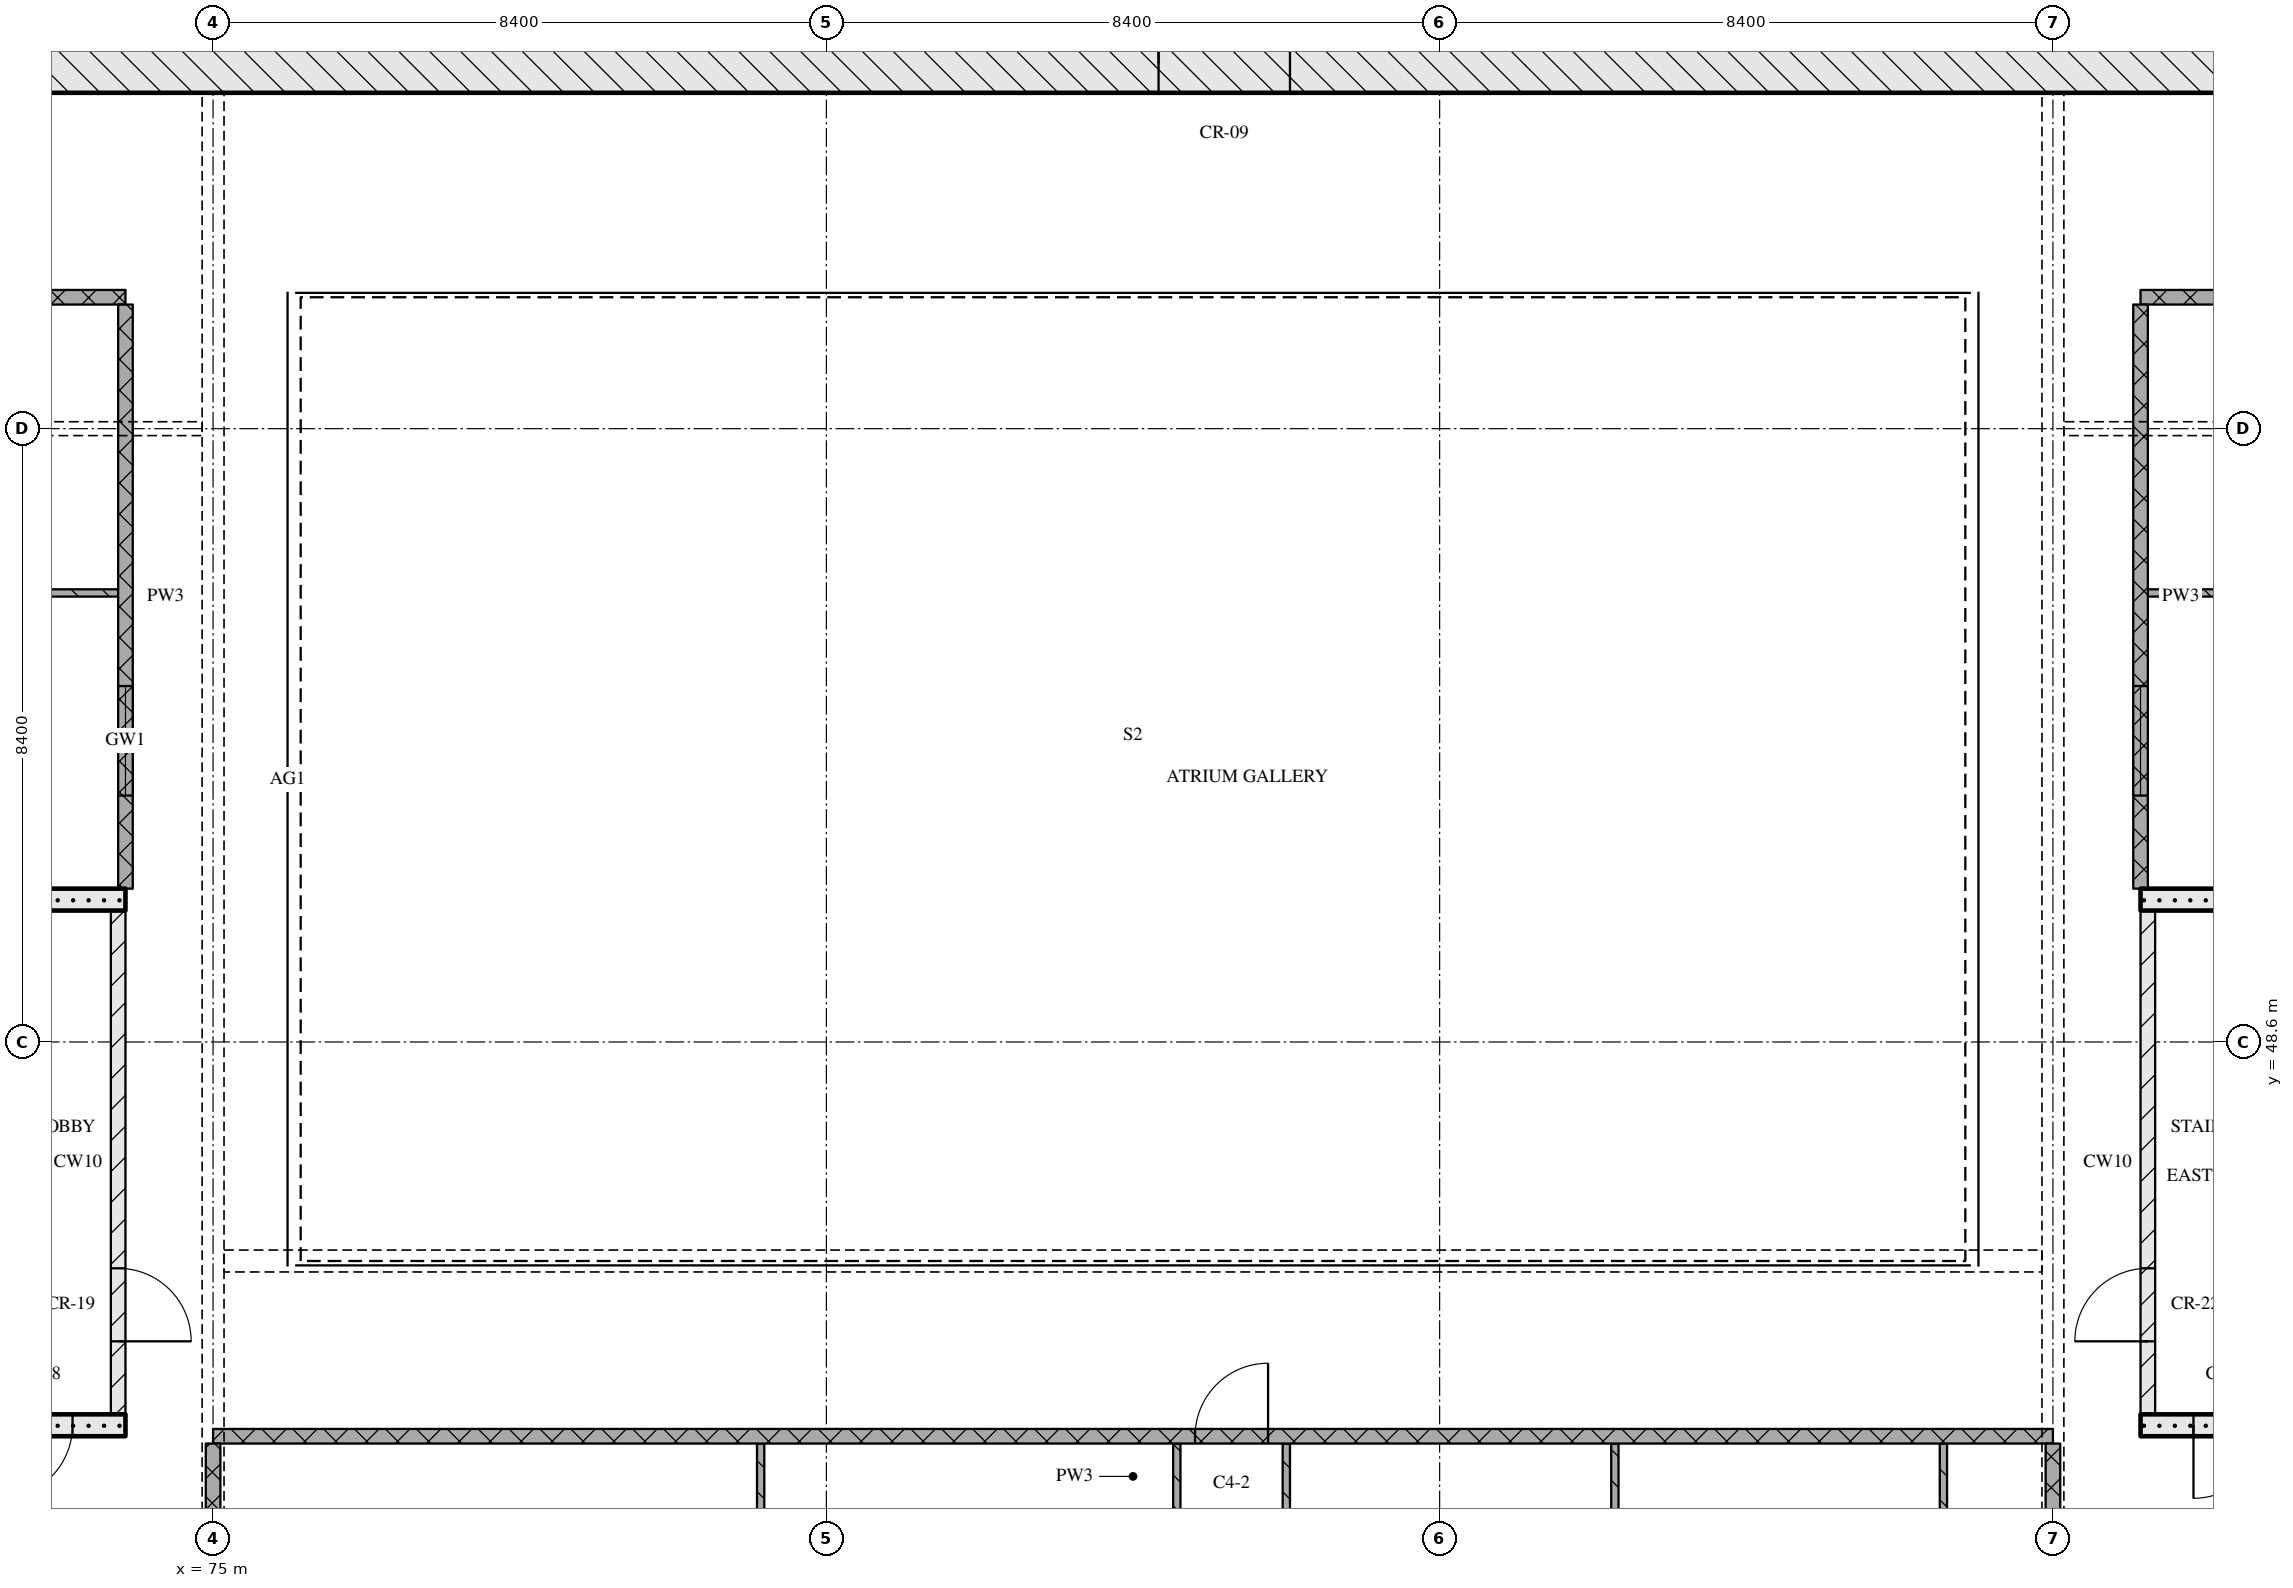
"""IFC4 building model, lengths in metres.
Left out: names, types, materials, properties, quantities, classifications, styles, units other than length and angle.
Written with IfcOpenShell. Run it as: python <this file> out.ifc"""

import sys

from ifc_helpers import new_model, si_unit, direction, frame, frame_2d, origin, place, context, subcontext, project, spatial, rectangle, extrude, element, fill, save


model = new_model("IFC4")
c1 = context("Model", 3, precision=1e-05, world=origin(), true_north=direction((0.0, 1.0)))
c2 = subcontext(c1, "Body", "Model", "MODEL_VIEW")
j1 = project(units=[si_unit("LENGTHUNIT", "METRE"), si_unit("PLANEANGLEUNIT", "RADIAN")], contexts=[c1])
p1 = place(None, origin())
s1 = spatial("IfcSite", under=j1, at=p1, CompositionType="ELEMENT")
p2 = place(p1, origin())
s2 = spatial("IfcBuilding", under=s1, at=p2, CompositionType="ELEMENT")
p3 = place(p2, frame((0.0, 0.0, 179.85)))
s3 = spatial("IfcBuildingStorey", under=s2, at=p3, CompositionType="ELEMENT", Elevation=179.85)
p4 = place(p3, frame((67.0, 62.0, 0.0), z_axis=(0.0, 0.0, 1.0), x_axis=(1.0, 0.0, 0.0)))
e1 = element("IfcWall", 1, at=p4, inside=s3, PredefinedType="SOLIDWALL", context=c2, shape_type="SweptSolid", body=[
    extrude(rectangle(XDim=41.2, YDim=0.8, at=frame_2d((20.6, 0.0))), origin(), (0.0, 0.0, 1.0), 3.32),
])
p5 = place(p4, frame((20.95, 0.0, 0.0)))
e2 = element("IfcOpeningElement", 2, at=p5, cuts=e1, PredefinedType="OPENING", context=c2, shape_type="SweptSolid", body=[
    extrude(rectangle(XDim=1.8, YDim=2.1, at=frame_2d((0.9, 1.05))), frame((0.0, 0.41, 0.0), z_axis=(0.0, -1.0, 0.0), x_axis=(1.0, 0.0, 0.0)), (0.0, 0.0, 1.0), 0.82),
])
p6 = place(p3, frame((68.2, 43.35, 0.0), z_axis=(0.0, 0.0, 1.0), x_axis=(1.0, 0.0, 0.0)))
e3 = element("IfcWall", 3, at=p6, inside=s3, PredefinedType="SOLIDWALL", context=c2, shape_type="SweptSolid", body=[
    extrude(rectangle(XDim=5.6, YDim=0.3, at=frame_2d((2.8, 0.0))), origin(), (0.0, 0.0, 1.0), 3.32),
])
p7 = place(p6, frame((3.875, 0.0, 0.0)))
e4 = element("IfcOpeningElement", 4, at=p7, cuts=e3, PredefinedType="OPENING", context=c2, shape_type="SweptSolid", body=[
    extrude(rectangle(XDim=1.0, YDim=2.1, at=frame_2d((0.5, 1.05))), frame((0.0, 0.16, 0.0), z_axis=(0.0, -1.0, 0.0), x_axis=(1.0, 0.0, 0.0)), (0.0, 0.0, 1.0), 0.32),
])
p8 = place(p3, frame((73.7, 43.5, 0.0), z_axis=(0.0, 0.0, 1.0), x_axis=(0.0, 1.0, 0.0)))
e5 = element("IfcWall", 5, at=p8, inside=s3, PredefinedType="PARTITIONING", context=c2, shape_type="SweptSolid", body=[
    extrude(rectangle(XDim=6.9, YDim=0.2, at=frame_2d((3.45, 0.0))), origin(), (0.0, 0.0, 1.0), 3.32),
])
p9 = place(p8, frame((1.0, 0.0, 0.0)))
e6 = element("IfcOpeningElement", 6, at=p9, cuts=e5, PredefinedType="OPENING", context=c2, shape_type="SweptSolid", body=[
    extrude(rectangle(XDim=1.0, YDim=2.1, at=frame_2d((0.5, 1.05))), frame((0.0, 0.11, 0.0), z_axis=(0.0, -1.0, 0.0), x_axis=(1.0, 0.0, 0.0)), (0.0, 0.0, 1.0), 0.22),
])
p10 = place(p3, frame((68.2, 50.55, 0.0), z_axis=(0.0, 0.0, 1.0), x_axis=(1.0, 0.0, 0.0)))
e7 = element("IfcWall", 7, at=p10, inside=s3, PredefinedType="SOLIDWALL", context=c2, shape_type="SweptSolid", body=[
    extrude(rectangle(XDim=5.6, YDim=0.3, at=frame_2d((2.8, 0.0))), origin(), (0.0, 0.0, 1.0), 3.32),
])
p11 = place(p3, frame((101.4, 43.35, 0.0), z_axis=(0.0, 0.0, 1.0), x_axis=(1.0, 0.0, 0.0)))
e8 = element("IfcWall", 8, at=p11, inside=s3, PredefinedType="SOLIDWALL", context=c2, shape_type="SweptSolid", body=[
    extrude(rectangle(XDim=5.6, YDim=0.3, at=frame_2d((2.8, 0.0))), origin(), (0.0, 0.0, 1.0), 3.32),
])
p12 = place(p11, frame((0.725, 0.0, 0.0)))
e9 = element("IfcOpeningElement", 9, at=p12, cuts=e8, PredefinedType="OPENING", context=c2, shape_type="SweptSolid", body=[
    extrude(rectangle(XDim=1.0, YDim=2.1, at=frame_2d((0.5, 1.05))), frame((0.0, 0.16, 0.0), z_axis=(0.0, -1.0, 0.0), x_axis=(1.0, 0.0, 0.0)), (0.0, 0.0, 1.0), 0.32),
])
p13 = place(p3, frame((101.5, 43.5, 0.0), z_axis=(0.0, 0.0, 1.0), x_axis=(0.0, 1.0, 0.0)))
e10 = element("IfcWall", 10, at=p13, inside=s3, PredefinedType="PARTITIONING", context=c2, shape_type="SweptSolid", body=[
    extrude(rectangle(XDim=6.9, YDim=0.2, at=frame_2d((3.45, 0.0))), origin(), (0.0, 0.0, 1.0), 3.32),
])
p14 = place(p13, frame((1.0, 0.0, 0.0)))
e11 = element("IfcOpeningElement", 11, at=p14, cuts=e10, PredefinedType="OPENING", context=c2, shape_type="SweptSolid", body=[
    extrude(rectangle(XDim=1.0, YDim=2.1, at=frame_2d((0.5, 1.05))), frame((0.0, 0.11, 0.0), z_axis=(0.0, -1.0, 0.0), x_axis=(1.0, 0.0, 0.0)), (0.0, 0.0, 1.0), 0.22),
])
p15 = place(p3, frame((101.4, 50.55, 0.0), z_axis=(0.0, 0.0, 1.0), x_axis=(1.0, 0.0, 0.0)))
e12 = element("IfcWall", 12, at=p15, inside=s3, PredefinedType="SOLIDWALL", context=c2, shape_type="SweptSolid", body=[
    extrude(rectangle(XDim=5.6, YDim=0.3, at=frame_2d((2.8, 0.0))), origin(), (0.0, 0.0, 1.0), 3.32),
])
p16 = place(p3, frame((100.2, 43.2, 0.0), z_axis=(0.0, 0.0, 1.0), x_axis=(-1.0, 0.0, 0.0)))
e13 = element("IfcWall", 13, at=p16, inside=s3, PredefinedType="PARTITIONING", context=c2, shape_type="SweptSolid", body=[
    extrude(rectangle(XDim=25.2, YDim=0.2, at=frame_2d((12.6, 0.0))), origin(), (0.0, 0.0, 1.0), 3.32),
])
p17 = place(p16, frame((10.75, 0.0, 0.0)))
e14 = element("IfcOpeningElement", 14, at=p17, cuts=e13, PredefinedType="OPENING", context=c2, shape_type="SweptSolid", body=[
    extrude(rectangle(XDim=1.0, YDim=2.1, at=frame_2d((0.5, 1.05))), frame((0.0, 0.11, 0.0), z_axis=(0.0, -1.0, 0.0), x_axis=(1.0, 0.0, 0.0)), (0.0, 0.0, 1.0), 0.22),
])
p18 = place(p3, frame((73.7, 54.75, 0.0), z_axis=(0.0, 0.0, 1.0), x_axis=(-1.0, 0.0, 0.0)))
e15 = element("IfcWall", 15, at=p18, inside=s3, PredefinedType="PARTITIONING", context=c2, shape_type="SweptSolid", body=[
    extrude(rectangle(XDim=6.2, YDim=0.1, at=frame_2d((3.1, 0.0))), origin(), (0.0, 0.0, 1.0), 3.32),
])
p19 = place(p18, frame((2.6, 0.0, 0.0)))
e16 = element("IfcOpeningElement", 16, at=p19, cuts=e15, PredefinedType="OPENING", context=c2, shape_type="SweptSolid", body=[
    extrude(rectangle(XDim=0.9, YDim=2.1, at=frame_2d((0.45, 1.05))), frame((0.0, 0.06, 0.0), z_axis=(0.0, -1.0, 0.0), x_axis=(1.0, 0.0, 0.0)), (0.0, 0.0, 1.0), 0.12),
])
p20 = place(p3, frame((101.5, 54.75, 0.0), z_axis=(0.0, 0.0, 1.0), x_axis=(1.0, 0.0, 0.0)))
e17 = element("IfcWall", 17, at=p20, inside=s3, PredefinedType="PARTITIONING", context=c2, shape_type="SweptSolid", body=[
    extrude(rectangle(XDim=6.2, YDim=0.1, at=frame_2d((3.1, 0.0))), origin(), (0.0, 0.0, 1.0), 3.32),
])
p21 = place(p3, frame((63.0, 58.8, 0.0), z_axis=(0.0, 0.0, 1.0), x_axis=(1.0, 0.0, 0.0)))
e18 = element("IfcWall", 18, at=p21, inside=s3, PredefinedType="PARTITIONING", context=c2, shape_type="SweptSolid", body=[
    extrude(rectangle(XDim=10.8, YDim=0.2, at=frame_2d((5.4, 0.0))), origin(), (0.0, 0.0, 1.0), 3.32),
])
p22 = place(p3, frame((112.2, 58.8, 0.0), z_axis=(0.0, 0.0, 1.0), x_axis=(-1.0, 0.0, 0.0)))
e19 = element("IfcWall", 19, at=p22, inside=s3, PredefinedType="PARTITIONING", context=c2, shape_type="SweptSolid", body=[
    extrude(rectangle(XDim=10.8, YDim=0.2, at=frame_2d((5.4, 0.0))), origin(), (0.0, 0.0, 1.0), 3.32),
])
p23 = place(p22, frame((2.85, 0.0, 0.0)))
e20 = element("IfcOpeningElement", 20, at=p23, cuts=e19, PredefinedType="OPENING", context=c2, shape_type="SweptSolid", body=[
    extrude(rectangle(XDim=1.0, YDim=2.1, at=frame_2d((0.5, 1.05))), frame((0.0, 0.11, 0.0), z_axis=(0.0, -1.0, 0.0), x_axis=(1.0, 0.0, 0.0)), (0.0, 0.0, 1.0), 0.22),
])
p24 = place(p3, frame((73.8, 58.7, 0.0), z_axis=(0.0, 0.0, 1.0), x_axis=(0.0, -1.0, 0.0)))
e21 = element("IfcWall", 21, at=p24, inside=s3, PredefinedType="PARTITIONING", context=c2, shape_type="SweptSolid", body=[
    extrude(rectangle(XDim=8.0, YDim=0.2, at=frame_2d((4.0, 0.0))), origin(), (0.0, 0.0, 1.0), 3.32),
])
p25 = place(p24, frame((5.225, 0.0, 0.9)))
e22 = element("IfcOpeningElement", 22, at=p25, cuts=e21, PredefinedType="OPENING", context=c2, shape_type="SweptSolid", body=[
    extrude(rectangle(XDim=1.5, YDim=1.5, at=frame_2d((0.75, 0.75))), frame((0.0, 0.11, 0.0), z_axis=(0.0, -1.0, 0.0), x_axis=(1.0, 0.0, 0.0)), (0.0, 0.0, 1.0), 0.22),
])
p26 = place(p3, frame((75.0, 43.1, 0.0), z_axis=(0.0, 0.0, 1.0), x_axis=(0.0, -1.0, 0.0)))
e23 = element("IfcWall", 23, at=p26, inside=s3, PredefinedType="PARTITIONING", context=c2, shape_type="SweptSolid", body=[
    extrude(rectangle(XDim=2.2, YDim=0.2, at=frame_2d((1.1, 0.0))), origin(), (0.0, 0.0, 1.0), 2.43),
])
p27 = place(p3, frame((82.5, 43.1, 0.0), z_axis=(0.0, 0.0, 1.0), x_axis=(0.0, -1.0, 0.0)))
e24 = element("IfcWall", 24, at=p27, inside=s3, PredefinedType="PARTITIONING", context=c2, shape_type="SweptSolid", body=[
    extrude(rectangle(XDim=4.95, YDim=0.1, at=frame_2d((2.475, 0.0))), origin(), (0.0, 0.0, 1.0), 3.32),
])
p28 = place(p3, frame((88.2, 38.15, 0.0), z_axis=(0.0, 0.0, 1.0), x_axis=(0.0, 1.0, 0.0)))
e25 = element("IfcWall", 25, at=p28, inside=s3, PredefinedType="PARTITIONING", context=c2, shape_type="SweptSolid", body=[
    extrude(rectangle(XDim=4.95, YDim=0.1, at=frame_2d((2.475, 0.0))), origin(), (0.0, 0.0, 1.0), 3.32),
])
p29 = place(p28, frame((2.05, 0.0, 0.0)))
e26 = element("IfcOpeningElement", 26, at=p29, cuts=e25, PredefinedType="OPENING", context=c2, shape_type="SweptSolid", body=[
    extrude(rectangle(XDim=0.9, YDim=2.1, at=frame_2d((0.45, 1.05))), frame((0.0, 0.06, 0.0), z_axis=(0.0, -1.0, 0.0), x_axis=(1.0, 0.0, 0.0)), (0.0, 0.0, 1.0), 0.12),
])
p30 = place(p3, frame((89.7, 43.1, 0.0), z_axis=(0.0, 0.0, 1.0), x_axis=(0.0, -1.0, 0.0)))
e27 = element("IfcWall", 27, at=p30, inside=s3, PredefinedType="PARTITIONING", context=c2, shape_type="SweptSolid", body=[
    extrude(rectangle(XDim=4.95, YDim=0.1, at=frame_2d((2.475, 0.0))), origin(), (0.0, 0.0, 1.0), 3.32),
])
p31 = place(p30, frame((2.05, 0.0, 0.0)))
e28 = element("IfcOpeningElement", 28, at=p31, cuts=e27, PredefinedType="OPENING", context=c2, shape_type="SweptSolid", body=[
    extrude(rectangle(XDim=0.8, YDim=2.1, at=frame_2d((0.4, 1.05))), frame((0.0, 0.06, 0.0), z_axis=(0.0, -1.0, 0.0), x_axis=(1.0, 0.0, 0.0)), (0.0, 0.0, 1.0), 0.12),
])
for number, where, z_axis, x_axis in (
    (29, (94.2, 43.1, 0.0), (0.0, 0.0, 1.0), (0.0, -1.0, 0.0)),
    (30, (98.7, 43.1, 0.0), (0.0, 0.0, 1.0), (0.0, -1.0, 0.0)),
):
    element("IfcWall", number, at=place(p3, frame(where, z_axis=z_axis, x_axis=x_axis)), inside=s3, PredefinedType="PARTITIONING", context=c2, shape_type="SweptSolid", body=[
        extrude(rectangle(XDim=4.95, YDim=0.1, at=frame_2d((2.475, 0.0))), origin(), (0.0, 0.0, 1.0), 3.32),
    ])
p32 = place(p3, frame((100.2, 43.1, 0.0), z_axis=(0.0, 0.0, 1.0), x_axis=(0.0, -1.0, 0.0)))
e31 = element("IfcWall", 31, at=p32, inside=s3, PredefinedType="PARTITIONING", context=c2, shape_type="SweptSolid", body=[
    extrude(rectangle(XDim=2.2, YDim=0.2, at=frame_2d((1.1, 0.0))), origin(), (0.0, 0.0, 1.0), 2.43),
])
p33 = place(p3, frame((101.4, 58.7, 0.0), z_axis=(0.0, 0.0, 1.0), x_axis=(0.0, -1.0, 0.0)))
e32 = element("IfcWall", 32, at=p33, inside=s3, PredefinedType="PARTITIONING", context=c2, shape_type="SweptSolid", body=[
    extrude(rectangle(XDim=8.0, YDim=0.2, at=frame_2d((4.0, 0.0))), origin(), (0.0, 0.0, 1.0), 3.32),
])
p34 = place(p33, frame((5.225, 0.0, 0.9)))
e33 = element("IfcOpeningElement", 33, at=p34, cuts=e32, PredefinedType="OPENING", context=c2, shape_type="SweptSolid", body=[
    extrude(rectangle(XDim=1.5, YDim=1.5, at=frame_2d((0.75, 0.75))), frame((0.0, 0.11, 0.0), z_axis=(0.0, -1.0, 0.0), x_axis=(1.0, 0.0, 0.0)), (0.0, 0.0, 1.0), 0.22),
])
p35 = place(p5, origin())
e34 = element("IfcDoor", 34, at=p35, inside=s3, OperationType="DOUBLE_DOOR_SINGLE_SWING", PredefinedType="DOOR", context=c2, shape_type="SweptSolid", body=[
    extrude(rectangle(XDim=1.8, YDim=2.1, at=frame_2d((0.9, 1.05))), frame((0.0, 0.025, 0.0), z_axis=(0.0, -1.0, 0.0), x_axis=(1.0, 0.0, 0.0)), (0.0, 0.0, 1.0), 0.05),
])
fill(e2, e34)
p36 = place(p7, origin())
e35 = element("IfcDoor", 35, at=p36, inside=s3, OperationType="SINGLE_SWING_RIGHT", PredefinedType="DOOR", context=c2, shape_type="SweptSolid", body=[
    extrude(rectangle(XDim=1.0, YDim=2.1, at=frame_2d((0.5, 1.05))), frame((0.0, 0.025, 0.0), z_axis=(0.0, -1.0, 0.0), x_axis=(1.0, 0.0, 0.0)), (0.0, 0.0, 1.0), 0.05),
])
fill(e4, e35)
p37 = place(p9, origin())
e36 = element("IfcDoor", 36, at=p37, inside=s3, OperationType="SINGLE_SWING_RIGHT", PredefinedType="DOOR", context=c2, shape_type="SweptSolid", body=[
    extrude(rectangle(XDim=1.0, YDim=2.1, at=frame_2d((0.5, 1.05))), frame((0.0, 0.025, 0.0), z_axis=(0.0, -1.0, 0.0), x_axis=(1.0, 0.0, 0.0)), (0.0, 0.0, 1.0), 0.05),
])
fill(e6, e36)
p38 = place(p12, origin())
e37 = element("IfcDoor", 37, at=p38, inside=s3, OperationType="SINGLE_SWING_RIGHT", PredefinedType="DOOR", context=c2, shape_type="SweptSolid", body=[
    extrude(rectangle(XDim=1.0, YDim=2.1, at=frame_2d((0.5, 1.05))), frame((0.0, 0.025, 0.0), z_axis=(0.0, -1.0, 0.0), x_axis=(1.0, 0.0, 0.0)), (0.0, 0.0, 1.0), 0.05),
])
fill(e9, e37)
p39 = place(p14, origin())
e38 = element("IfcDoor", 38, at=p39, inside=s3, OperationType="SINGLE_SWING_LEFT", PredefinedType="DOOR", context=c2, shape_type="SweptSolid", body=[
    extrude(rectangle(XDim=1.0, YDim=2.1, at=frame_2d((0.5, 1.05))), frame((0.0, 0.025, 0.0), z_axis=(0.0, -1.0, 0.0), x_axis=(1.0, 0.0, 0.0)), (0.0, 0.0, 1.0), 0.05),
])
fill(e11, e38)
p40 = place(p17, origin())
e39 = element("IfcDoor", 39, at=p40, inside=s3, OperationType="SINGLE_SWING_RIGHT", PredefinedType="DOOR", context=c2, shape_type="SweptSolid", body=[
    extrude(rectangle(XDim=1.0, YDim=2.1, at=frame_2d((0.5, 1.05))), frame((0.0, 0.025, 0.0), z_axis=(0.0, -1.0, 0.0), x_axis=(1.0, 0.0, 0.0)), (0.0, 0.0, 1.0), 0.05),
])
fill(e14, e39)
p41 = place(p25, origin())
e40 = element("IfcWindow", 40, at=p41, inside=s3, PartitioningType="SINGLE_PANEL", PredefinedType="WINDOW", context=c2, shape_type="SweptSolid", body=[
    extrude(rectangle(XDim=1.5, YDim=1.5, at=frame_2d((0.75, 0.75))), frame((0.0, 0.03, 0.0), z_axis=(0.0, -1.0, 0.0), x_axis=(1.0, 0.0, 0.0)), (0.0, 0.0, 1.0), 0.06),
])
fill(e22, e40)
p42 = place(p34, origin())
e41 = element("IfcWindow", 41, at=p42, inside=s3, PartitioningType="SINGLE_PANEL", PredefinedType="WINDOW", context=c2, shape_type="SweptSolid", body=[
    extrude(rectangle(XDim=1.5, YDim=1.5, at=frame_2d((0.75, 0.75))), frame((0.0, 0.03, 0.0), z_axis=(0.0, -1.0, 0.0), x_axis=(1.0, 0.0, 0.0)), (0.0, 0.0, 1.0), 0.06),
])
fill(e33, e41)
save(model, sys.argv[1])
